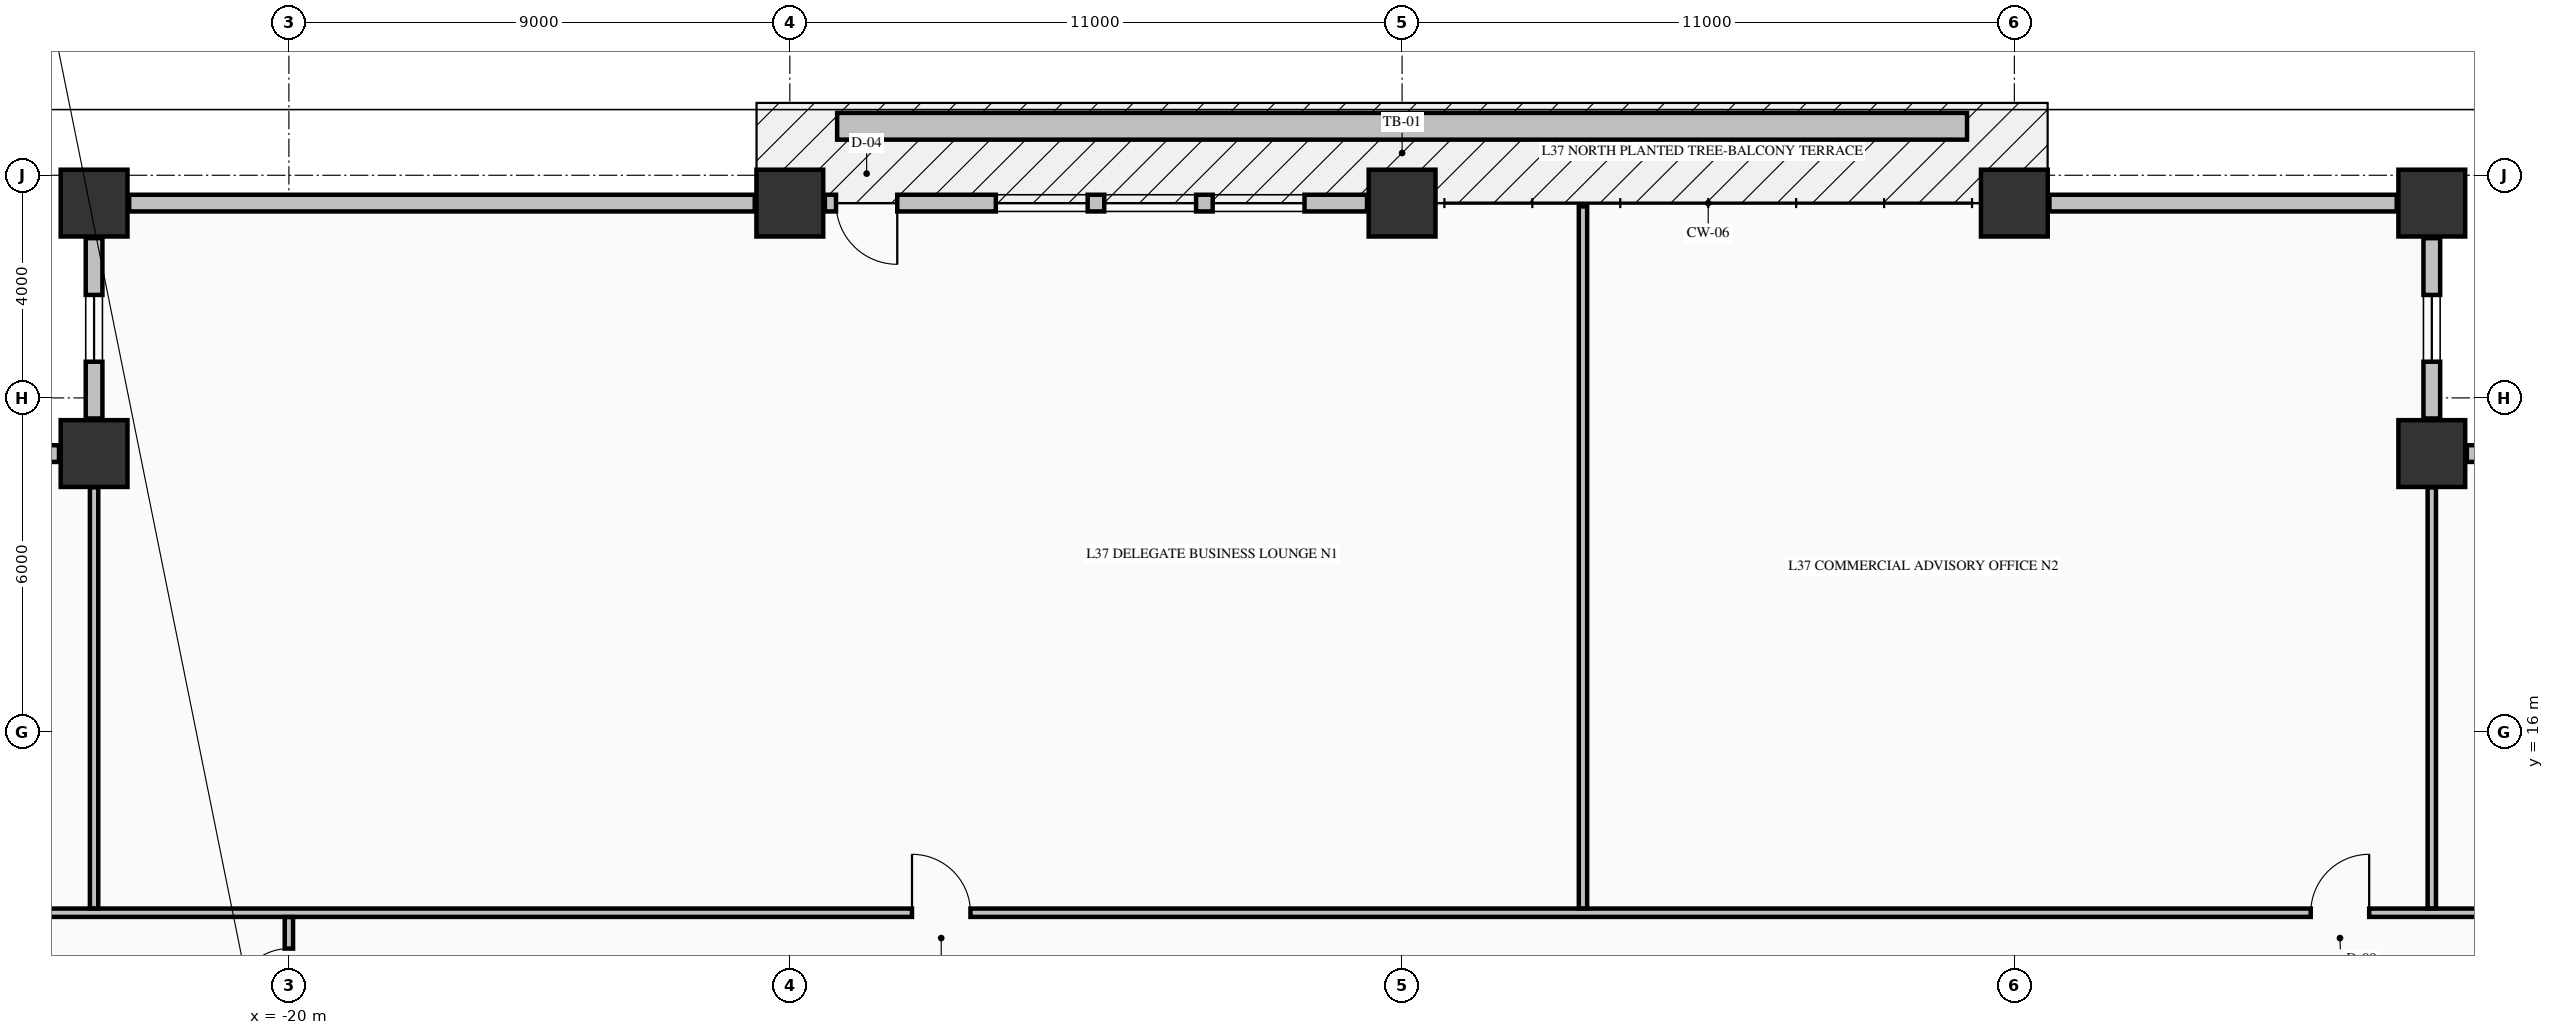
"""IFC4 building model, lengths in metres.
Left out: names, types, materials, properties, quantities, classifications, styles, units other than length and angle.
Written with IfcOpenShell. Run it as: python <this file> out.ifc"""

import sys

from ifc_helpers import new_model, si_unit, direction, frame, frame_2d, origin, origin_2d, place, context, subcontext, project, spatial, rectangle, extrude, element, fill, save


model = new_model("IFC4")
c1 = context("Model", 3, precision=1e-05, world=origin(), true_north=direction((0.0, 1.0)))
c2 = subcontext(c1, "Body", "Model", "MODEL_VIEW")
j1 = project(units=[si_unit("LENGTHUNIT", "METRE"), si_unit("PLANEANGLEUNIT", "RADIAN")], contexts=[c1])
p1 = place(None, origin())
s1 = spatial("IfcSite", under=j1, at=p1, CompositionType="ELEMENT")
p2 = place(p1, origin())
s2 = spatial("IfcBuilding", under=s1, at=p2, CompositionType="ELEMENT")
p3 = place(p2, frame((0.0, 0.0, 146.34)))
s3 = spatial("IfcBuildingStorey", under=s2, at=p3, CompositionType="ELEMENT", Elevation=146.34)
for number, where, z_axis, x_axis in (
    (1, (-23.5, 25.5, -0.25), (0.0, 0.0, 1.0), (1.0, 0.0, 0.0)),
    (2, (-11.0, 25.5, -0.25), (0.0, 0.0, 1.0), (1.0, 0.0, 0.0)),
    (3, (0.0, 25.5, -0.25), (0.0, 0.0, 1.0), (1.0, 0.0, 0.0)),
    (4, (11.0, 25.5, -0.25), (0.0, 0.0, 1.0), (1.0, 0.0, 0.0)),
    (5, (18.5, 25.5, -0.25), (0.0, 0.0, 1.0), (1.0, 0.0, 0.0)),
    (6, (18.5, 21.0, -0.25), (0.0, 0.0, 1.0), (1.0, 0.0, 0.0)),
    (7, (-23.5, 21.0, -0.25), (0.0, 0.0, 1.0), (1.0, 0.0, 0.0)),
):
    element("IfcColumn", number, at=place(p3, frame(where, z_axis=z_axis, x_axis=x_axis)), inside=s3, PredefinedType="COLUMN", context=c2, shape_type="SweptSolid", body=[
        extrude(rectangle(XDim=1.2, YDim=1.2, at=origin_2d()), origin(), (0.0, 0.0, 1.0), 3.57),
    ])
p4 = place(p3, frame((22.37, 21.0, 0.0), z_axis=(0.0, 0.0, 1.0), x_axis=(-1.0, 0.0, 0.0)))
e8 = element("IfcWall", 8, at=p4, inside=s3, PredefinedType="STANDARD", context=c2, shape_type="SweptSolid", body=[
    extrude(rectangle(XDim=3.24, YDim=0.3, at=frame_2d((1.62, 0.0))), origin(), (0.0, 0.0, 1.0), 2.712),
])
p5 = place(p4, frame((1.02, 0.0, 0.82)))
e9 = element("IfcOpeningElement", 9, at=p5, cuts=e8, PredefinedType="OPENING", context=c2, shape_type="SweptSolid", body=[
    extrude(rectangle(XDim=1.2, YDim=1.65, at=frame_2d((0.6, 0.825))), frame((0.0, 0.16, 0.0), z_axis=(0.0, -1.0, 0.0), x_axis=(1.0, 0.0, 0.0)), (0.0, 0.0, 1.0), 0.32),
])
p6 = place(p3, frame((18.5, 21.63, 0.0), z_axis=(0.0, 0.0, 1.0), x_axis=(0.0, 1.0, 0.0)))
e10 = element("IfcWall", 10, at=p6, inside=s3, PredefinedType="STANDARD", context=c2, shape_type="SweptSolid", body=[
    extrude(rectangle(XDim=3.24, YDim=0.3, at=frame_2d((1.62, 0.0))), origin(), (0.0, 0.0, 1.0), 2.712),
])
p7 = place(p6, frame((1.02, 0.0, 0.82)))
e11 = element("IfcOpeningElement", 11, at=p7, cuts=e10, PredefinedType="OPENING", context=c2, shape_type="SweptSolid", body=[
    extrude(rectangle(XDim=1.2, YDim=1.65, at=frame_2d((0.6, 0.825))), frame((0.0, 0.16, 0.0), z_axis=(0.0, -1.0, 0.0), x_axis=(1.0, 0.0, 0.0)), (0.0, 0.0, 1.0), 0.32),
])
p8 = place(p3, frame((-23.5, 24.87, 0.0), z_axis=(0.0, 0.0, 1.0), x_axis=(0.0, -1.0, 0.0)))
e12 = element("IfcWall", 12, at=p8, inside=s3, PredefinedType="STANDARD", context=c2, shape_type="SweptSolid", body=[
    extrude(rectangle(XDim=3.24, YDim=0.3, at=frame_2d((1.62, 0.0))), origin(), (0.0, 0.0, 1.0), 2.712),
])
p9 = place(p8, frame((1.02, 0.0, 0.82)))
e13 = element("IfcOpeningElement", 13, at=p9, cuts=e12, PredefinedType="OPENING", context=c2, shape_type="SweptSolid", body=[
    extrude(rectangle(XDim=1.2, YDim=1.65, at=frame_2d((0.6, 0.825))), frame((0.0, 0.16, 0.0), z_axis=(0.0, -1.0, 0.0), x_axis=(1.0, 0.0, 0.0)), (0.0, 0.0, 1.0), 0.32),
])
p10 = place(p3, frame((-24.13, 21.0, 0.0), z_axis=(0.0, 0.0, 1.0), x_axis=(-1.0, 0.0, 0.0)))
e14 = element("IfcWall", 14, at=p10, inside=s3, PredefinedType="STANDARD", context=c2, shape_type="SweptSolid", body=[
    extrude(rectangle(XDim=3.24, YDim=0.3, at=frame_2d((1.62, 0.0))), origin(), (0.0, 0.0, 1.0), 2.712),
])
p11 = place(p10, frame((1.02, 0.0, 0.82)))
e15 = element("IfcOpeningElement", 15, at=p11, cuts=e14, PredefinedType="OPENING", context=c2, shape_type="SweptSolid", body=[
    extrude(rectangle(XDim=1.2, YDim=1.65, at=frame_2d((0.6, 0.825))), frame((0.0, 0.16, 0.0), z_axis=(0.0, -1.0, 0.0), x_axis=(1.0, 0.0, 0.0)), (0.0, 0.0, 1.0), 0.32),
])
p12 = place(p3, frame((-11.63, 25.5, 0.0), z_axis=(0.0, 0.0, 1.0), x_axis=(-1.0, 0.0, 0.0)))
e16 = element("IfcWall", 16, at=p12, inside=s3, PredefinedType="STANDARD", context=c2, shape_type="SweptSolid", body=[
    extrude(rectangle(XDim=11.24, YDim=0.3, at=frame_2d((5.62, 0.0))), origin(), (0.0, 0.0, 1.0), 2.712),
])
p13 = place(p3, frame((-0.63, 25.5, 0.0), z_axis=(0.0, 0.0, 1.0), x_axis=(-1.0, 0.0, 0.0)))
e17 = element("IfcWall", 17, at=p13, inside=s3, PredefinedType="STANDARD", context=c2, shape_type="SweptSolid", body=[
    extrude(rectangle(XDim=9.74, YDim=0.3, at=frame_2d((4.87, 0.0))), origin(), (0.0, 0.0, 1.0), 2.712),
])
p14 = place(p13, frame((8.44, 0.0, 0.0)))
e18 = element("IfcOpeningElement", 18, at=p14, cuts=e17, PredefinedType="OPENING", context=c2, shape_type="SweptSolid", body=[
    extrude(rectangle(XDim=1.1, YDim=2.15, at=frame_2d((0.55, 1.075))), frame((0.0, 0.16, 0.0), z_axis=(0.0, -1.0, 0.0), x_axis=(1.0, 0.0, 0.0)), (0.0, 0.0, 1.0), 0.32),
])
p15 = place(p13, frame((1.123, 0.0, 0.8)))
e19 = element("IfcOpeningElement", 19, at=p15, cuts=e17, PredefinedType="OPENING", context=c2, shape_type="SweptSolid", body=[
    extrude(rectangle(XDim=1.65, YDim=1.7, at=frame_2d((0.825, 0.85))), frame((0.0, 0.16, 0.0), z_axis=(0.0, -1.0, 0.0), x_axis=(1.0, 0.0, 0.0)), (0.0, 0.0, 1.0), 0.32),
])
p16 = place(p13, frame((3.071, 0.0, 0.8)))
e20 = element("IfcOpeningElement", 20, at=p16, cuts=e17, PredefinedType="OPENING", context=c2, shape_type="SweptSolid", body=[
    extrude(rectangle(XDim=1.65, YDim=1.7, at=frame_2d((0.825, 0.85))), frame((0.0, 0.16, 0.0), z_axis=(0.0, -1.0, 0.0), x_axis=(1.0, 0.0, 0.0)), (0.0, 0.0, 1.0), 0.32),
])
p17 = place(p13, frame((5.019, 0.0, 0.8)))
e21 = element("IfcOpeningElement", 21, at=p17, cuts=e17, PredefinedType="OPENING", context=c2, shape_type="SweptSolid", body=[
    extrude(rectangle(XDim=1.65, YDim=1.7, at=frame_2d((0.825, 0.85))), frame((0.0, 0.16, 0.0), z_axis=(0.0, -1.0, 0.0), x_axis=(1.0, 0.0, 0.0)), (0.0, 0.0, 1.0), 0.32),
])
p18 = place(p3, frame((17.87, 25.5, 0.0), z_axis=(0.0, 0.0, 1.0), x_axis=(-1.0, 0.0, 0.0)))
e22 = element("IfcWall", 22, at=p18, inside=s3, PredefinedType="STANDARD", context=c2, shape_type="SweptSolid", body=[
    extrude(rectangle(XDim=6.24, YDim=0.3, at=frame_2d((3.12, 0.0))), origin(), (0.0, 0.0, 1.0), 2.712),
])
p19 = place(p3, frame((-27.835, 12.75, 0.0), z_axis=(0.0, 0.0, 1.0), x_axis=(1.0, 0.0, 0.0)))
e23 = element("IfcWall", 23, at=p19, inside=s3, PredefinedType="PARTITIONING", context=c2, shape_type="SweptSolid", body=[
    extrude(rectangle(XDim=50.67, YDim=0.15, at=frame_2d((25.335, 0.0))), origin(), (0.0, 0.0, 1.0), 3.32),
])
p20 = place(p19, frame((19.03, 0.0, 0.0)))
e24 = element("IfcOpeningElement", 24, at=p20, cuts=e23, PredefinedType="OPENING", context=c2, shape_type="SweptSolid", body=[
    extrude(rectangle(XDim=1.05, YDim=2.15, at=frame_2d((0.525, 1.075))), frame((0.0, 0.085, 0.0), z_axis=(0.0, -1.0, 0.0), x_axis=(1.0, 0.0, 0.0)), (0.0, 0.0, 1.0), 0.17),
])
p21 = place(p19, frame((44.16, 0.0, 0.0)))
e25 = element("IfcOpeningElement", 25, at=p21, cuts=e23, PredefinedType="OPENING", context=c2, shape_type="SweptSolid", body=[
    extrude(rectangle(XDim=1.05, YDim=2.15, at=frame_2d((0.525, 1.075))), frame((0.0, 0.085, 0.0), z_axis=(0.0, -1.0, 0.0), x_axis=(1.0, 0.0, 0.0)), (0.0, 0.0, 1.0), 0.17),
])
p22 = place(p3, frame((-23.5, 12.828, 0.0), z_axis=(0.0, 0.0, 1.0), x_axis=(0.0, 1.0, 0.0)))
e26 = element("IfcWall", 26, at=p22, inside=s3, PredefinedType="PARTITIONING", context=c2, shape_type="SweptSolid", body=[
    extrude(rectangle(XDim=7.566, YDim=0.15, at=frame_2d((3.783, 0.0))), origin(), (0.0, 0.0, 1.0), 3.32),
])
p23 = place(p3, frame((-20.0, 11.006, 0.0), z_axis=(0.0, 0.0, 1.0), x_axis=(0.0, 1.0, 0.0)))
e27 = element("IfcWall", 27, at=p23, inside=s3, PredefinedType="PARTITIONING", context=c2, shape_type="SweptSolid", body=[
    extrude(rectangle(XDim=1.666, YDim=0.15, at=frame_2d((0.833, 0.0))), origin(), (0.0, 0.0, 1.0), 2.81),
])
p24 = place(p23, frame((0.15, 0.0, 0.0)))
e28 = element("IfcOpeningElement", 28, at=p24, cuts=e27, PredefinedType="OPENING", context=c2, shape_type="SweptSolid", body=[
    extrude(rectangle(XDim=0.95, YDim=2.15, at=frame_2d((0.475, 1.075))), frame((0.0, 0.085, 0.0), z_axis=(0.0, -1.0, 0.0), x_axis=(1.0, 0.0, 0.0)), (0.0, 0.0, 1.0), 0.17),
])
p25 = place(p3, frame((3.25, 12.828, 0.0), z_axis=(0.0, 0.0, 1.0), x_axis=(0.0, 1.0, 0.0)))
e29 = element("IfcWall", 29, at=p25, inside=s3, PredefinedType="PARTITIONING", context=c2, shape_type="SweptSolid", body=[
    extrude(rectangle(XDim=12.612, YDim=0.15, at=frame_2d((6.306, 0.0))), origin(), (0.0, 0.0, 1.0), 3.32),
])
p26 = place(p3, frame((18.5, 12.828, 0.0), z_axis=(0.0, 0.0, 1.0), x_axis=(0.0, 1.0, 0.0)))
e30 = element("IfcWall", 30, at=p26, inside=s3, PredefinedType="PARTITIONING", context=c2, shape_type="SweptSolid", body=[
    extrude(rectangle(XDim=7.566, YDim=0.15, at=frame_2d((3.783, 0.0))), origin(), (0.0, 0.0, 1.0), 3.32),
])
p27 = place(p3, frame((-10.15, 26.88, -0.04), z_axis=(0.0, 0.0, 1.0), x_axis=(1.0, 0.0, 0.0)))
e31 = element("IfcWall", 31, at=p27, inside=s3, PredefinedType="PARAPET", context=c2, shape_type="SweptSolid", body=[
    extrude(rectangle(XDim=20.3, YDim=0.48, at=frame_2d((10.15, 0.0))), origin(), (0.0, 0.0, 1.0), 0.52),
])
p28 = place(p7, origin())
e32 = element("IfcWindow", 32, at=p28, inside=s3, PartitioningType="SINGLE_PANEL", PredefinedType="WINDOW", context=c2, shape_type="SweptSolid", body=[
    extrude(rectangle(XDim=1.2, YDim=1.65, at=frame_2d((0.6, 0.825))), frame((0.0, 0.03, 0.0), z_axis=(0.0, -1.0, 0.0), x_axis=(1.0, 0.0, 0.0)), (0.0, 0.0, 1.0), 0.06),
])
fill(e11, e32)
p29 = place(p9, origin())
e33 = element("IfcWindow", 33, at=p29, inside=s3, PartitioningType="SINGLE_PANEL", PredefinedType="WINDOW", context=c2, shape_type="SweptSolid", body=[
    extrude(rectangle(XDim=1.2, YDim=1.65, at=frame_2d((0.6, 0.825))), frame((0.0, 0.03, 0.0), z_axis=(0.0, -1.0, 0.0), x_axis=(1.0, 0.0, 0.0)), (0.0, 0.0, 1.0), 0.06),
])
fill(e13, e33)
p30 = place(p14, origin())
e34 = element("IfcDoor", 34, at=p30, inside=s3, OperationType="SINGLE_SWING_LEFT", PredefinedType="DOOR", context=c2, shape_type="SweptSolid", body=[
    extrude(rectangle(XDim=1.1, YDim=2.15, at=frame_2d((0.55, 1.075))), frame((0.0, 0.025, 0.0), z_axis=(0.0, -1.0, 0.0), x_axis=(1.0, 0.0, 0.0)), (0.0, 0.0, 1.0), 0.05),
])
fill(e18, e34)
p31 = place(p15, origin())
e35 = element("IfcWindow", 35, at=p31, inside=s3, PartitioningType="SINGLE_PANEL", PredefinedType="WINDOW", context=c2, shape_type="SweptSolid", body=[
    extrude(rectangle(XDim=1.65, YDim=1.7, at=frame_2d((0.825, 0.85))), frame((0.0, 0.03, 0.0), z_axis=(0.0, -1.0, 0.0), x_axis=(1.0, 0.0, 0.0)), (0.0, 0.0, 1.0), 0.06),
])
fill(e19, e35)
p32 = place(p16, origin())
e36 = element("IfcWindow", 36, at=p32, inside=s3, PartitioningType="SINGLE_PANEL", PredefinedType="WINDOW", context=c2, shape_type="SweptSolid", body=[
    extrude(rectangle(XDim=1.65, YDim=1.7, at=frame_2d((0.825, 0.85))), frame((0.0, 0.03, 0.0), z_axis=(0.0, -1.0, 0.0), x_axis=(1.0, 0.0, 0.0)), (0.0, 0.0, 1.0), 0.06),
])
fill(e20, e36)
p33 = place(p17, origin())
e37 = element("IfcWindow", 37, at=p33, inside=s3, PartitioningType="SINGLE_PANEL", PredefinedType="WINDOW", context=c2, shape_type="SweptSolid", body=[
    extrude(rectangle(XDim=1.65, YDim=1.7, at=frame_2d((0.825, 0.85))), frame((0.0, 0.03, 0.0), z_axis=(0.0, -1.0, 0.0), x_axis=(1.0, 0.0, 0.0)), (0.0, 0.0, 1.0), 0.06),
])
fill(e21, e37)
p34 = place(p20, origin())
e38 = element("IfcDoor", 38, at=p34, inside=s3, OperationType="SINGLE_SWING_LEFT", PredefinedType="DOOR", context=c2, shape_type="SweptSolid", body=[
    extrude(rectangle(XDim=1.05, YDim=2.15, at=frame_2d((0.525, 1.075))), frame((0.0, 0.025, 0.0), z_axis=(0.0, -1.0, 0.0), x_axis=(1.0, 0.0, 0.0)), (0.0, 0.0, 1.0), 0.05),
])
fill(e24, e38)
p35 = place(p21, origin())
e39 = element("IfcDoor", 39, at=p35, inside=s3, OperationType="SINGLE_SWING_RIGHT", PredefinedType="DOOR", context=c2, shape_type="SweptSolid", body=[
    extrude(rectangle(XDim=1.05, YDim=2.15, at=frame_2d((0.525, 1.075))), frame((0.0, 0.025, 0.0), z_axis=(0.0, -1.0, 0.0), x_axis=(1.0, 0.0, 0.0)), (0.0, 0.0, 1.0), 0.05),
])
fill(e25, e39)
p36 = place(p24, origin())
e40 = element("IfcDoor", 40, at=p36, inside=s3, OperationType="SINGLE_SWING_LEFT", PredefinedType="DOOR", context=c2, shape_type="SweptSolid", body=[
    extrude(rectangle(XDim=0.95, YDim=2.15, at=frame_2d((0.475, 1.075))), frame((0.0, 0.025, 0.0), z_axis=(0.0, -1.0, 0.0), x_axis=(1.0, 0.0, 0.0)), (0.0, 0.0, 1.0), 0.05),
])
fill(e28, e40)
save(model, sys.argv[1])
